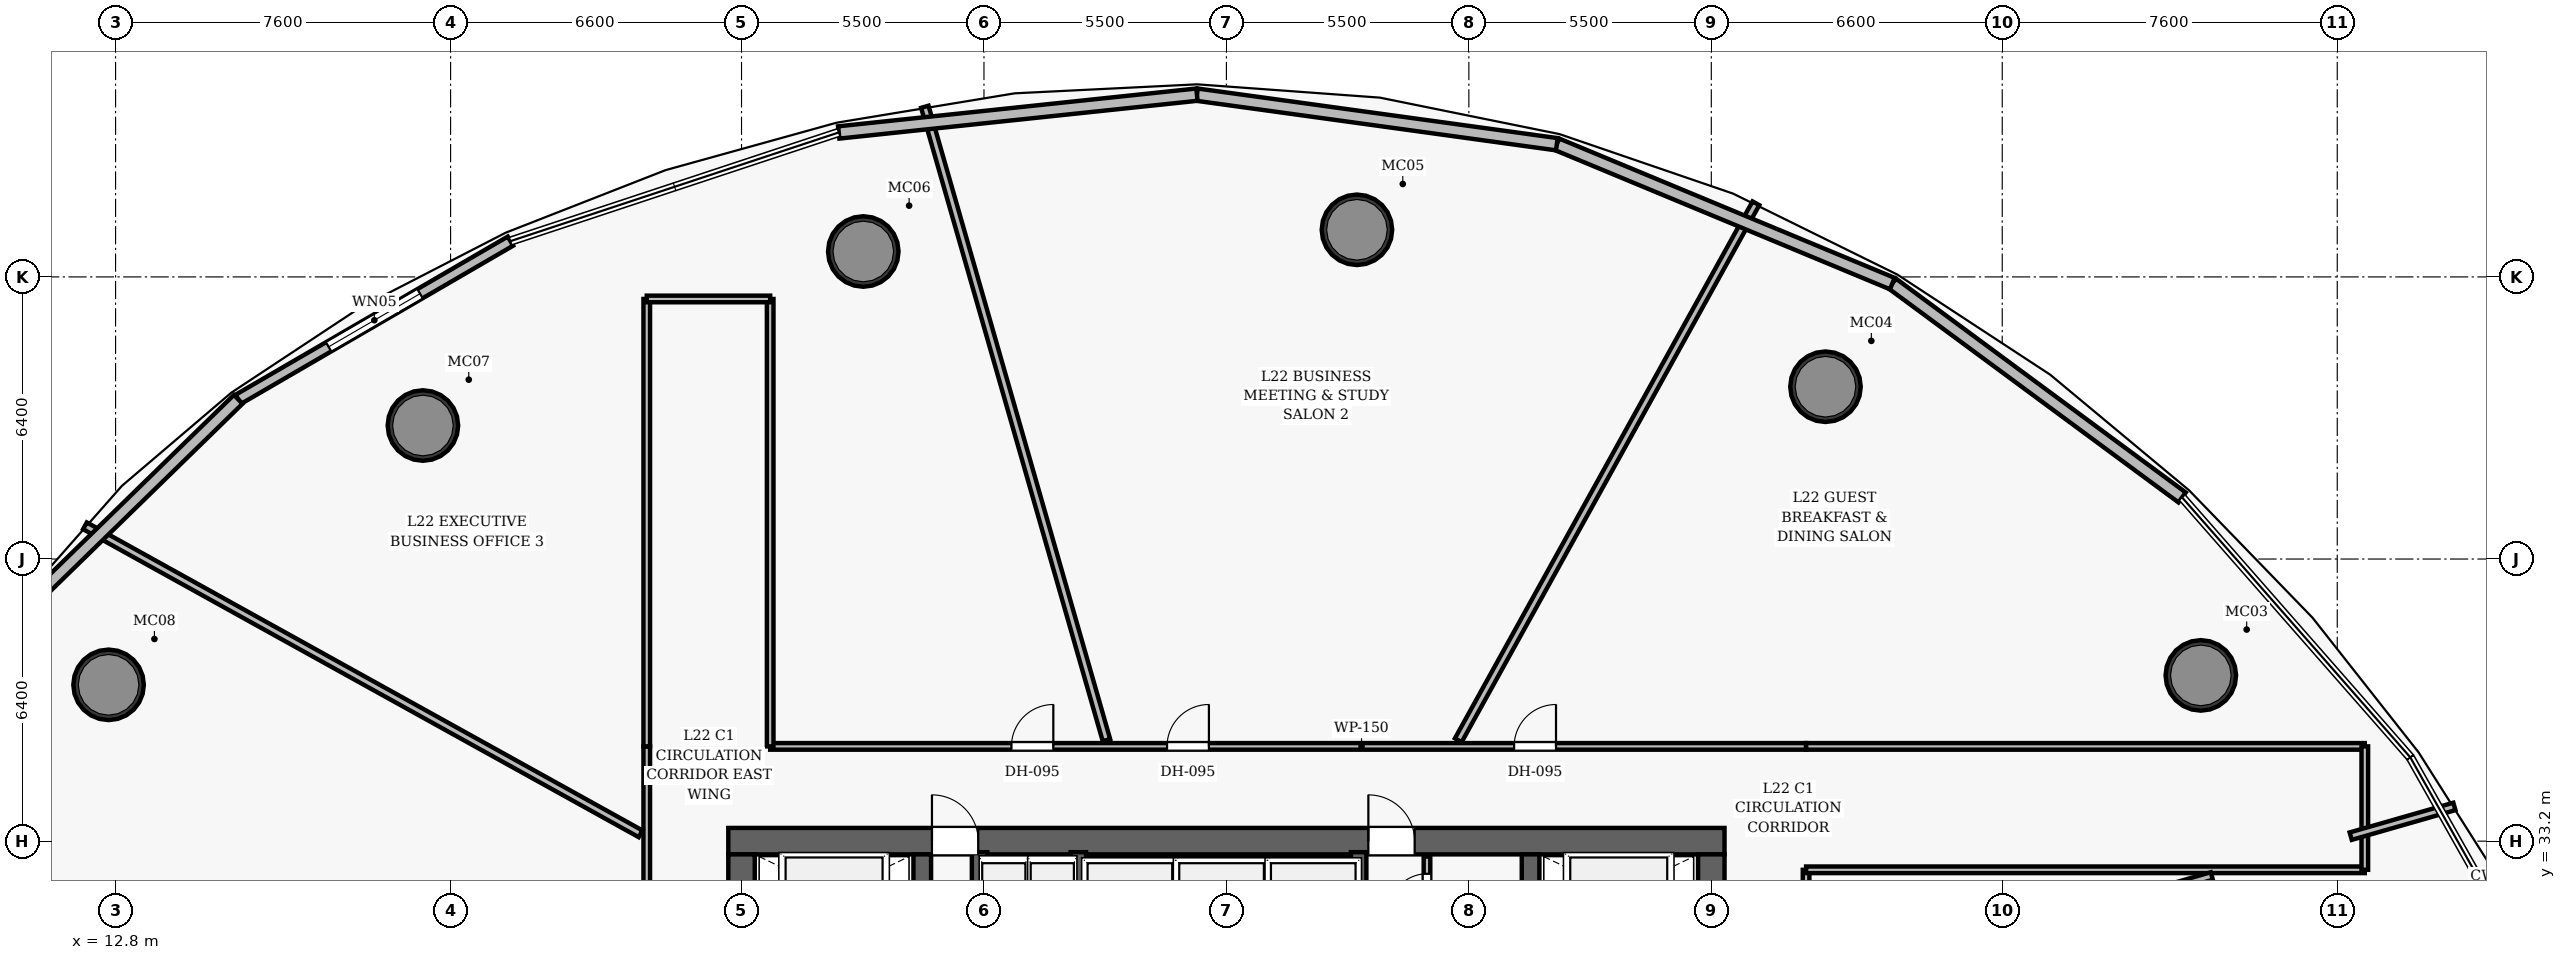
"""IFC4 building model, lengths in metres.
Left out: names, types, materials, properties, quantities, classifications, styles, units other than length and angle.
Written with IfcOpenShell. Run it as: python <this file> out.ifc"""

import sys

from ifc_helpers import new_model, si_unit, direction, frame, frame_2d, origin, origin_2d, place, context, subcontext, project, spatial, rectangle, hollow_circle, extrude, element, fill, save


model = new_model("IFC4")
c1 = context("Model", 3, precision=1e-05, world=origin(), true_north=direction((0.0, 1.0)))
c2 = subcontext(c1, "Body", "Model", "MODEL_VIEW")
j1 = project(units=[si_unit("LENGTHUNIT", "METRE"), si_unit("PLANEANGLEUNIT", "RADIAN")], contexts=[c1])
p1 = place(None, origin())
s1 = spatial("IfcSite", under=j1, at=p1, CompositionType="ELEMENT")
p2 = place(p1, origin())
s2 = spatial("IfcBuilding", under=s1, at=p2, CompositionType="ELEMENT")
p3 = place(p2, frame((0.0, 0.0, 93.9)))
s3 = spatial("IfcBuildingStorey", under=s2, at=p3, CompositionType="ELEMENT", Elevation=93.9)
p4 = place(p3, frame((26.7, 33.2, 0.0), z_axis=(0.0, 0.0, 1.0), x_axis=(1.0, 0.0, 0.0)))
e1 = element("IfcWall", 1, at=p4, inside=s3, PredefinedType="SHEAR", context=c2, shape_type="SweptSolid", body=[
    extrude(rectangle(XDim=22.6, YDim=0.6, at=frame_2d((11.3, 0.0))), origin(), (0.0, 0.0, 1.0), 3.5),
])
p5 = place(p4, frame((4.62, 0.0, 0.0)))
e2 = element("IfcOpeningElement", 2, at=p5, cuts=e1, PredefinedType="OPENING", context=c2, shape_type="SweptSolid", body=[
    extrude(rectangle(XDim=1.05, YDim=2.15, at=frame_2d((0.525, 1.075))), frame((0.0, 0.31, 0.0), z_axis=(0.0, -1.0, 0.0), x_axis=(1.0, 0.0, 0.0)), (0.0, 0.0, 1.0), 0.62),
])
p6 = place(p4, frame((14.52, 0.0, 0.0)))
e3 = element("IfcOpeningElement", 3, at=p6, cuts=e1, PredefinedType="OPENING", context=c2, shape_type="SweptSolid", body=[
    extrude(rectangle(XDim=1.05, YDim=2.15, at=frame_2d((0.525, 1.075))), frame((0.0, 0.31, 0.0), z_axis=(0.0, -1.0, 0.0), x_axis=(1.0, 0.0, 0.0)), (0.0, 0.0, 1.0), 0.62),
])
p7 = place(p3, frame((27.0, 19.1, 0.0), z_axis=(0.0, 0.0, 1.0), x_axis=(0.0, 1.0, 0.0)))
e4 = element("IfcWall", 4, at=p7, inside=s3, PredefinedType="SHEAR", context=c2, shape_type="SweptSolid", body=[
    extrude(rectangle(XDim=13.8, YDim=0.6, at=frame_2d((6.9, 0.0))), origin(), (0.0, 0.0, 1.0), 3.5),
])
p8 = place(p7, frame((8.2, 0.0, 0.0)))
e5 = element("IfcOpeningElement", 5, at=p8, cuts=e4, PredefinedType="OPENING", context=c2, shape_type="SweptSolid", body=[
    extrude(rectangle(XDim=1.05, YDim=2.15, at=frame_2d((0.525, 1.075))), frame((0.0, 0.31, 0.0), z_axis=(0.0, -1.0, 0.0), x_axis=(1.0, 0.0, 0.0)), (0.0, 0.0, 1.0), 0.62),
])
p9 = place(p3, frame((49.0, 19.1, 0.0), z_axis=(0.0, 0.0, 1.0), x_axis=(0.0, 1.0, 0.0)))
e6 = element("IfcWall", 6, at=p9, inside=s3, PredefinedType="SHEAR", context=c2, shape_type="SweptSolid", body=[
    extrude(rectangle(XDim=13.8, YDim=0.6, at=frame_2d((6.9, 0.0))), origin(), (0.0, 0.0, 1.0), 3.5),
])
p10 = place(p9, frame((8.2, 0.0, 0.0)))
e7 = element("IfcOpeningElement", 7, at=p10, cuts=e6, PredefinedType="OPENING", context=c2, shape_type="SweptSolid", body=[
    extrude(rectangle(XDim=1.05, YDim=2.15, at=frame_2d((0.525, 1.075))), frame((0.0, 0.31, 0.0), z_axis=(0.0, -1.0, 0.0), x_axis=(1.0, 0.0, 0.0)), (0.0, 0.0, 1.0), 0.62),
])
for number, where, z_axis, x_axis in (
    (8, (31.1, 19.1, 0.0), (0.0, 0.0, 1.0), (0.0, 1.0, 0.0)),
    (9, (44.9, 19.1, 0.0), (0.0, 0.0, 1.0), (0.0, 1.0, 0.0)),
):
    element("IfcWall", number, at=place(p3, frame(where, z_axis=z_axis, x_axis=x_axis)), inside=s3, PredefinedType="SHEAR", context=c2, shape_type="SweptSolid", body=[
        extrude(rectangle(XDim=13.8, YDim=0.4, at=frame_2d((6.9, 0.0))), origin(), (0.0, 0.0, 1.0), 3.5),
    ])
for number, where, z_axis, x_axis in (
    (10, (60.105, 36.96, 0.0), (0.0, 0.0, 1.0), (1.0, 0.0, 0.0)),
    (11, (51.59, 43.509, 0.0), (0.0, 0.0, 1.0), (1.0, 0.0, 0.0)),
    (12, (40.961, 47.069, 0.0), (0.0, 0.0, 1.0), (1.0, 0.0, 0.0)),
    (13, (29.762, 46.577, 0.0), (0.0, 0.0, 1.0), (1.0, 0.0, 0.0)),
    (14, (19.772, 42.629, 0.0), (0.0, 0.0, 1.0), (1.0, 0.0, 0.0)),
    (15, (12.641, 36.746, 0.0), (0.0, 0.0, 1.0), (1.0, 0.0, 0.0)),
):
    element("IfcColumn", number, at=place(p3, frame(where, z_axis=z_axis, x_axis=x_axis)), inside=s3, PredefinedType="COLUMN", context=c2, shape_type="SweptSolid", body=[
        extrude(hollow_circle(Radius=0.8, WallThickness=0.06, at=origin_2d()), origin(), (0.0, 0.0, 1.0), 3.5),
    ])
p11 = place(p3, frame((34.64, 26.69, 0.0), z_axis=(0.0, 0.0, 1.0), x_axis=(0.0, 1.0, 0.0)))
e16 = element("IfcWall", 16, at=p11, inside=s3, PredefinedType="SHEAR", context=c2, shape_type="SweptSolid", body=[
    extrude(rectangle(XDim=6.26, YDim=0.35, at=frame_2d((3.13, 0.0))), origin(), (0.0, 0.0, 1.0), 3.5),
])
p12 = place(p3, frame((32.4, 30.22, 0.0), z_axis=(0.0, 0.0, 1.0), x_axis=(0.0, 1.0, 0.0)))
e17 = element("IfcWall", 17, at=p12, inside=s3, PredefinedType="SHEAR", context=c2, shape_type="SweptSolid", body=[
    extrude(rectangle(XDim=2.73, YDim=0.35, at=frame_2d((1.365, 0.0))), origin(), (0.0, 0.0, 1.0), 2.5),
])
p13 = place(p3, frame((41.0, 30.87, 0.0), z_axis=(0.0, 0.0, 1.0), x_axis=(0.0, 1.0, 0.0)))
e18 = element("IfcWall", 18, at=p13, inside=s3, PredefinedType="SHEAR", context=c2, shape_type="SweptSolid", body=[
    extrude(rectangle(XDim=2.08, YDim=0.35, at=frame_2d((1.04, 0.0))), origin(), (0.0, 0.0, 1.0), 2.5),
])
p14 = place(p3, frame((42.55, 28.1, 0.0), z_axis=(0.0, 0.0, 1.0), x_axis=(0.0, 1.0, 0.0)))
e19 = element("IfcWall", 19, at=p14, inside=s3, PredefinedType="PARTITIONING", context=c2, shape_type="SweptSolid", body=[
    extrude(rectangle(XDim=4.75, YDim=0.15, at=frame_2d((2.375, 0.0))), origin(), (0.0, 0.0, 1.0), 2.5),
])
p15 = place(p14, frame((0.35, 0.0, 0.0)))
e20 = element("IfcOpeningElement", 20, at=p15, cuts=e19, PredefinedType="OPENING", context=c2, shape_type="SweptSolid", body=[
    extrude(rectangle(XDim=0.85, YDim=2.1, at=frame_2d((0.425, 1.05))), frame((0.0, 0.085, 0.0), z_axis=(0.0, -1.0, 0.0), x_axis=(1.0, 0.0, 0.0)), (0.0, 0.0, 1.0), 0.17),
])
p16 = place(p14, frame((1.93, 0.0, 0.0)))
e21 = element("IfcOpeningElement", 21, at=p16, cuts=e19, PredefinedType="OPENING", context=c2, shape_type="SweptSolid", body=[
    extrude(rectangle(XDim=0.85, YDim=2.1, at=frame_2d((0.425, 1.05))), frame((0.0, 0.085, 0.0), z_axis=(0.0, -1.0, 0.0), x_axis=(1.0, 0.0, 0.0)), (0.0, 0.0, 1.0), 0.17),
])
p17 = place(p14, frame((3.51, 0.0, 0.0)))
e22 = element("IfcOpeningElement", 22, at=p17, cuts=e19, PredefinedType="OPENING", context=c2, shape_type="SweptSolid", body=[
    extrude(rectangle(XDim=0.85, YDim=2.1, at=frame_2d((0.425, 1.05))), frame((0.0, 0.085, 0.0), z_axis=(0.0, -1.0, 0.0), x_axis=(1.0, 0.0, 0.0)), (0.0, 0.0, 1.0), 0.17),
])
p18 = place(p3, frame((27.65, 35.35, 0.0), z_axis=(0.0, 0.0, 1.0), x_axis=(1.0, 0.0, 0.0)))
e23 = element("IfcWall", 23, at=p18, inside=s3, PredefinedType="PARTITIONING", context=c2, shape_type="SweptSolid", body=[
    extrude(rectangle(XDim=23.5, YDim=0.15, at=frame_2d((11.75, 0.0))), origin(), (0.0, 0.0, 1.0), 2.5),
])
p19 = place(p18, frame((16.877, 0.0, 0.0)))
e24 = element("IfcOpeningElement", 24, at=p19, cuts=e23, PredefinedType="OPENING", context=c2, shape_type="SweptSolid", body=[
    extrude(rectangle(XDim=0.95, YDim=2.15, at=frame_2d((0.475, 1.075))), frame((0.0, 0.085, 0.0), z_axis=(0.0, -1.0, 0.0), x_axis=(1.0, 0.0, 0.0)), (0.0, 0.0, 1.0), 0.17),
])
p20 = place(p18, frame((9.003, 0.0, 0.0)))
e25 = element("IfcOpeningElement", 25, at=p20, cuts=e23, PredefinedType="OPENING", context=c2, shape_type="SweptSolid", body=[
    extrude(rectangle(XDim=0.95, YDim=2.15, at=frame_2d((0.475, 1.075))), frame((0.0, 0.085, 0.0), z_axis=(0.0, -1.0, 0.0), x_axis=(1.0, 0.0, 0.0)), (0.0, 0.0, 1.0), 0.17),
])
p21 = place(p18, frame((5.473, 0.0, 0.0)))
e26 = element("IfcOpeningElement", 26, at=p21, cuts=e23, PredefinedType="OPENING", context=c2, shape_type="SweptSolid", body=[
    extrude(rectangle(XDim=0.95, YDim=2.15, at=frame_2d((0.475, 1.075))), frame((0.0, 0.085, 0.0), z_axis=(0.0, -1.0, 0.0), x_axis=(1.0, 0.0, 0.0)), (0.0, 0.0, 1.0), 0.17),
])
p22 = place(p3, frame((24.85, 19.45, 0.0), z_axis=(0.0, 0.0, 1.0), x_axis=(0.0, 1.0, 0.0)))
e27 = element("IfcWall", 27, at=p22, inside=s3, PredefinedType="PARTITIONING", context=c2, shape_type="SweptSolid", body=[
    extrude(rectangle(XDim=15.9, YDim=0.15, at=frame_2d((7.95, 0.0))), origin(), (0.0, 0.0, 1.0), 2.5),
])
p23 = place(p22, frame((7.852, 0.0, 0.0)))
e28 = element("IfcOpeningElement", 28, at=p23, cuts=e27, PredefinedType="OPENING", context=c2, shape_type="SweptSolid", body=[
    extrude(rectangle(XDim=0.95, YDim=2.15, at=frame_2d((0.475, 1.075))), frame((0.0, 0.085, 0.0), z_axis=(0.0, -1.0, 0.0), x_axis=(1.0, 0.0, 0.0)), (0.0, 0.0, 1.0), 0.17),
])
p24 = place(p3, frame((51.15, 16.65, 0.0), z_axis=(0.0, 0.0, 1.0), x_axis=(0.0, 1.0, 0.0)))
e29 = element("IfcWall", 29, at=p24, inside=s3, PredefinedType="PARTITIONING", context=c2, shape_type="SweptSolid", body=[
    extrude(rectangle(XDim=15.9, YDim=0.15, at=frame_2d((7.95, 0.0))), origin(), (0.0, 0.0, 1.0), 2.5),
])
p25 = place(p24, frame((7.098, 0.0, 0.0)))
e30 = element("IfcOpeningElement", 30, at=p25, cuts=e29, PredefinedType="OPENING", context=c2, shape_type="SweptSolid", body=[
    extrude(rectangle(XDim=0.95, YDim=2.15, at=frame_2d((0.475, 1.075))), frame((0.0, 0.085, 0.0), z_axis=(0.0, -1.0, 0.0), x_axis=(1.0, 0.0, 0.0)), (0.0, 0.0, 1.0), 0.17),
])
for number, where, z_axis, x_axis in (
    (31, (51.15, 35.35, 0.0), (0.0, 0.0, 1.0), (1.0, 0.0, 0.0)),
    (32, (51.15, 32.55, 0.0), (0.0, 0.0, 1.0), (1.0, 0.0, 0.0)),
):
    element("IfcWall", number, at=place(p3, frame(where, z_axis=z_axis, x_axis=x_axis)), inside=s3, PredefinedType="PARTITIONING", context=c2, shape_type="SweptSolid", body=[
        extrude(rectangle(XDim=12.675, YDim=0.15, at=frame_2d((6.337, 0.0))), origin(), (0.0, 0.0, 1.0), 2.5),
    ])
p26 = place(p3, frame((63.825, 32.55, 0.0), z_axis=(0.0, 0.0, 1.0), x_axis=(0.0, 1.0, 0.0)))
e33 = element("IfcWall", 33, at=p26, inside=s3, PredefinedType="PARTITIONING", context=c2, shape_type="SweptSolid", body=[
    extrude(rectangle(XDim=2.8, YDim=0.15, at=frame_2d((1.4, 0.0))), origin(), (0.0, 0.0, 1.0), 2.5),
])
for number, where, z_axis, x_axis in (
    (34, (24.85, 35.35, 0.0), (0.0, 0.0, 1.0), (0.0, 1.0, 0.0)),
    (35, (27.65, 35.35, 0.0), (0.0, 0.0, 1.0), (0.0, 1.0, 0.0)),
):
    element("IfcWall", number, at=place(p3, frame(where, z_axis=z_axis, x_axis=x_axis)), inside=s3, PredefinedType="PARTITIONING", context=c2, shape_type="SweptSolid", body=[
        extrude(rectangle(XDim=10.15, YDim=0.15, at=frame_2d((5.075, 0.0))), origin(), (0.0, 0.0, 1.0), 2.5),
    ])
p27 = place(p3, frame((24.85, 45.5, 0.0), z_axis=(0.0, 0.0, 1.0), x_axis=(1.0, 0.0, 0.0)))
e36 = element("IfcWall", 36, at=p27, inside=s3, PredefinedType="PARTITIONING", context=c2, shape_type="SweptSolid", body=[
    extrude(rectangle(XDim=2.8, YDim=0.15, at=frame_2d((1.4, 0.0))), origin(), (0.0, 0.0, 1.0), 2.5),
])
p28 = place(p3, frame((51.29, 29.811, 0.0), z_axis=(0.0, 0.0, 1.0), x_axis=(0.961261668066, 0.275637453019, 0.0)))
e37 = element("IfcWall", 37, at=p28, inside=s3, PredefinedType="PARTITIONING", context=c2, shape_type="SweptSolid", body=[
    extrude(rectangle(XDim=9.429, YDim=0.175, at=frame_2d((4.715, 0.0))), origin(), (0.0, 0.0, 1.0), 2.5),
])
p29 = place(p3, frame((63.505, 33.313, 0.0), z_axis=(0.0, 0.0, 1.0), x_axis=(0.961256191917, 0.275656549898, 0.0)))
e38 = element("IfcWall", 38, at=p29, inside=s3, PredefinedType="PARTITIONING", context=c2, shape_type="SweptSolid", body=[
    extrude(rectangle(XDim=2.447, YDim=0.175, at=frame_2d((1.224, 0.0))), origin(), (0.0, 0.0, 1.0), 2.5),
])
p30 = place(p3, frame((43.26, 35.49, 0.0), z_axis=(0.0, 0.0, 1.0), x_axis=(0.484809179238, 0.874619951594, 0.0)))
e39 = element("IfcWall", 39, at=p30, inside=s3, PredefinedType="PARTITIONING", context=c2, shape_type="SweptSolid", body=[
    extrude(rectangle(XDim=13.927, YDim=0.175, at=frame_2d((6.963, 0.0))), origin(), (0.0, 0.0, 1.0), 2.5),
])
p31 = place(p3, frame((35.279, 35.49, 0.0), z_axis=(0.0, 0.0, 1.0), x_axis=(-0.27563986981, 0.961260975059, 0.0)))
e40 = element("IfcWall", 40, at=p31, inside=s3, PredefinedType="PARTITIONING", context=c2, shape_type="SweptSolid", body=[
    extrude(rectangle(XDim=14.949, YDim=0.175, at=frame_2d((7.475, 0.0))), origin(), (0.0, 0.0, 1.0), 2.5),
])
p32 = place(p3, frame((24.71, 33.367, 0.0), z_axis=(0.0, 0.0, 1.0), x_axis=(-0.874619537092, 0.48480992702, 0.0)))
e41 = element("IfcWall", 41, at=p32, inside=s3, PredefinedType="PARTITIONING", context=c2, shape_type="SweptSolid", body=[
    extrude(rectangle(XDim=14.412, YDim=0.175, at=frame_2d((7.206, 0.0))), origin(), (0.0, 0.0, 1.0), 2.5),
])
p33 = place(p3, frame((53.106, 45.849, 0.0), z_axis=(0.0, 0.0, 1.0), x_axis=(0.804633561054, -0.593771700593, 0.0)))
e42 = element("IfcWall", 42, at=p33, inside=s3, PredefinedType="SOLIDWALL", context=c2, shape_type="SweptSolid", body=[
    extrude(rectangle(XDim=8.171, YDim=0.28, at=frame_2d((4.085, 0.0))), origin(), (0.0, 0.0, 1.0), 3.15),
])
p34 = place(p3, frame((45.495, 49.01, 0.0), z_axis=(0.0, 0.0, 1.0), x_axis=(0.923503174131, -0.383590781133, 0.0)))
e43 = element("IfcWall", 43, at=p34, inside=s3, PredefinedType="SOLIDWALL", context=c2, shape_type="SweptSolid", body=[
    extrude(rectangle(XDim=8.241, YDim=0.28, at=frame_2d((4.121, 0.0))), origin(), (0.0, 0.0, 1.0), 3.15),
])
p35 = place(p3, frame((37.331, 50.135, 0.0), z_axis=(0.0, 0.0, 1.0), x_axis=(0.99064683014, -0.136450935994, 0.0)))
e44 = element("IfcWall", 44, at=p35, inside=s3, PredefinedType="SOLIDWALL", context=c2, shape_type="SweptSolid", body=[
    extrude(rectangle(XDim=8.241, YDim=0.28, at=frame_2d((4.121, 0.0))), origin(), (0.0, 0.0, 1.0), 3.15),
])
p36 = place(p3, frame((29.205, 49.277, 0.0), z_axis=(0.0, 0.0, 1.0), x_axis=(0.994475779268, 0.104966301492, 0.0)))
e45 = element("IfcWall", 45, at=p36, inside=s3, PredefinedType="SOLIDWALL", context=c2, shape_type="SweptSolid", body=[
    extrude(rectangle(XDim=8.171, YDim=0.28, at=frame_2d((4.085, 0.0))), origin(), (0.0, 0.0, 1.0), 3.15),
])
p37 = place(p3, frame((15.582, 43.223, 0.0), z_axis=(0.0, 0.0, 1.0), x_axis=(0.864602156162, 0.502457074346, 0.0)))
e46 = element("IfcWall", 46, at=p37, inside=s3, PredefinedType="SOLIDWALL", context=c2, shape_type="SweptSolid", body=[
    extrude(rectangle(XDim=7.143, YDim=0.24, at=frame_2d((3.571, 0.0))), origin(), (0.0, 0.0, 1.0), 3.15),
])
p38 = place(p37, frame((2.371, 0.0, 0.85)))
e47 = element("IfcOpeningElement", 47, at=p38, cuts=e46, PredefinedType="OPENING", context=c2, shape_type="SweptSolid", body=[
    extrude(rectangle(XDim=2.4, YDim=2.0, at=frame_2d((1.2, 1.0))), frame((0.0, 0.13, 0.0), z_axis=(0.0, -1.0, 0.0), x_axis=(1.0, 0.0, 0.0)), (0.0, 0.0, 1.0), 0.26),
])
p39 = place(p3, frame((11.135, 38.885, 0.0), z_axis=(0.0, 0.0, 1.0), x_axis=(0.715932856162, 0.698169138152, 0.0)))
e48 = element("IfcWall", 48, at=p39, inside=s3, PredefinedType="SOLIDWALL", context=c2, shape_type="SweptSolid", body=[
    extrude(rectangle(XDim=6.212, YDim=0.28, at=frame_2d((3.106, 0.0))), origin(), (0.0, 0.0, 1.0), 3.15),
])
p40 = place(p5, origin())
e49 = element("IfcDoor", 49, at=p40, inside=s3, OperationType="SINGLE_SWING_LEFT", PredefinedType="DOOR", context=c2, shape_type="SweptSolid", body=[
    extrude(rectangle(XDim=1.05, YDim=2.15, at=frame_2d((0.525, 1.075))), frame((0.0, 0.025, 0.0), z_axis=(0.0, -1.0, 0.0), x_axis=(1.0, 0.0, 0.0)), (0.0, 0.0, 1.0), 0.05),
])
fill(e2, e49)
p41 = place(p6, origin())
e50 = element("IfcDoor", 50, at=p41, inside=s3, OperationType="SINGLE_SWING_LEFT", PredefinedType="DOOR", context=c2, shape_type="SweptSolid", body=[
    extrude(rectangle(XDim=1.05, YDim=2.15, at=frame_2d((0.525, 1.075))), frame((0.0, 0.025, 0.0), z_axis=(0.0, -1.0, 0.0), x_axis=(1.0, 0.0, 0.0)), (0.0, 0.0, 1.0), 0.05),
])
fill(e3, e50)
p42 = place(p17, origin())
e51 = element("IfcDoor", 51, at=p42, inside=s3, OperationType="SINGLE_SWING_LEFT", PredefinedType="DOOR", context=c2, shape_type="SweptSolid", body=[
    extrude(rectangle(XDim=0.85, YDim=2.1, at=frame_2d((0.425, 1.05))), frame((0.0, 0.025, 0.0), z_axis=(0.0, -1.0, 0.0), x_axis=(1.0, 0.0, 0.0)), (0.0, 0.0, 1.0), 0.05),
])
fill(e22, e51)
p43 = place(p19, origin())
e52 = element("IfcDoor", 52, at=p43, inside=s3, OperationType="SINGLE_SWING_RIGHT", PredefinedType="DOOR", context=c2, shape_type="SweptSolid", body=[
    extrude(rectangle(XDim=0.95, YDim=2.15, at=frame_2d((0.475, 1.075))), frame((0.0, 0.025, 0.0), z_axis=(0.0, -1.0, 0.0), x_axis=(1.0, 0.0, 0.0)), (0.0, 0.0, 1.0), 0.05),
])
fill(e24, e52)
p44 = place(p20, origin())
e53 = element("IfcDoor", 53, at=p44, inside=s3, OperationType="SINGLE_SWING_RIGHT", PredefinedType="DOOR", context=c2, shape_type="SweptSolid", body=[
    extrude(rectangle(XDim=0.95, YDim=2.15, at=frame_2d((0.475, 1.075))), frame((0.0, 0.025, 0.0), z_axis=(0.0, -1.0, 0.0), x_axis=(1.0, 0.0, 0.0)), (0.0, 0.0, 1.0), 0.05),
])
fill(e25, e53)
p45 = place(p21, origin())
e54 = element("IfcDoor", 54, at=p45, inside=s3, OperationType="SINGLE_SWING_RIGHT", PredefinedType="DOOR", context=c2, shape_type="SweptSolid", body=[
    extrude(rectangle(XDim=0.95, YDim=2.15, at=frame_2d((0.475, 1.075))), frame((0.0, 0.025, 0.0), z_axis=(0.0, -1.0, 0.0), x_axis=(1.0, 0.0, 0.0)), (0.0, 0.0, 1.0), 0.05),
])
fill(e26, e54)
p46 = place(p38, origin())
e55 = element("IfcWindow", 55, at=p46, inside=s3, PartitioningType="SINGLE_PANEL", PredefinedType="WINDOW", context=c2, shape_type="SweptSolid", body=[
    extrude(rectangle(XDim=2.4, YDim=2.0, at=frame_2d((1.2, 1.0))), frame((0.0, 0.03, 0.0), z_axis=(0.0, -1.0, 0.0), x_axis=(1.0, 0.0, 0.0)), (0.0, 0.0, 1.0), 0.06),
])
fill(e47, e55)
save(model, sys.argv[1])
